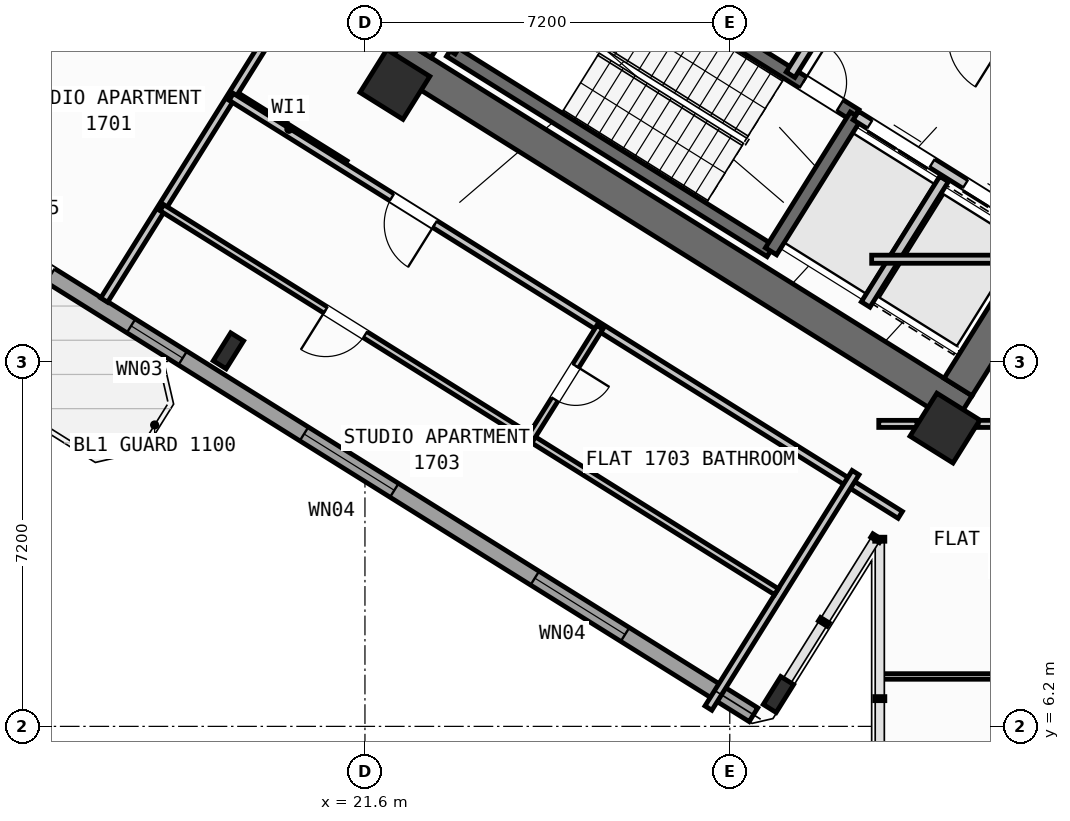
"""IFC4 building model, lengths in metres.
Left out: names, types, materials, properties, quantities, classifications, styles, units other than length and angle.
Written with IfcOpenShell. Run it as: python <this file> out.ifc"""

import sys

from ifc_helpers import new_model, si_unit, direction, frame, frame_2d, origin, origin_2d, place, context, subcontext, project, spatial, rectangle, hollow_rectangle, i_section, extrude, source, transform, mapped, element, fill, save


model = new_model("IFC4")
c1 = context("Model", 3, precision=1e-05, world=origin(), true_north=direction((0.0, 1.0)))
c2 = subcontext(c1, "Body", "Model", "MODEL_VIEW")
j1 = project(units=[si_unit("LENGTHUNIT", "METRE"), si_unit("PLANEANGLEUNIT", "RADIAN")], contexts=[c1])
p1 = place(None, origin())
s1 = spatial("IfcSite", under=j1, at=p1, CompositionType="ELEMENT")
p2 = place(p1, origin())
s2 = spatial("IfcBuilding", under=s1, at=p2, CompositionType="ELEMENT")
p3 = place(p2, frame((0.0, 0.0, 67.2)))
s3 = spatial("IfcBuildingStorey", under=s2, at=p3, CompositionType="ELEMENT", Elevation=67.2)
p4 = place(p3, frame((33.409, 12.45, 0.0), z_axis=(0.0, 0.0, 1.0), x_axis=(-0.848051132073, 0.529914405721, 0.0)))
e1 = element("IfcWall", 1, at=p4, inside=s3, PredefinedType="SHEAR", context=c2, shape_type="SweptSolid", body=[
    extrude(rectangle(XDim=13.24, YDim=0.65, at=frame_2d((6.62, 0.0))), origin(), (0.0, 0.0, 1.0), 4.22),
])
p5 = place(p3, frame((36.683, 18.304, 0.0), z_axis=(0.0, 0.0, 1.0), x_axis=(-0.529899109053, -0.848060690178, 0.0)))
e2 = element("IfcWall", 2, at=p5, inside=s3, PredefinedType="SHEAR", context=c2, shape_type="SweptSolid", body=[
    extrude(rectangle(XDim=6.375, YDim=0.65, at=frame_2d((3.188, 0.0))), origin(), (0.0, 0.0, 1.0), 4.22),
])
p6 = place(p3, frame((26.007, 24.976, 0.0), z_axis=(0.0, 0.0, 1.0), x_axis=(-0.529916319127, -0.848049936456, 0.0)))
e3 = element("IfcWall", 3, at=p6, inside=s3, PredefinedType="SHEAR", context=c2, shape_type="SweptSolid", body=[
    extrude(rectangle(XDim=6.375, YDim=0.65, at=frame_2d((3.188, 0.0))), origin(), (0.0, 0.0, 1.0), 4.22),
])
m1 = source(origin(), c2, "Body", "SweptSolid", [
    extrude(hollow_rectangle(XDim=1.0, YDim=1.0, WallThickness=0.04, at=origin_2d()), origin(), (0.0, 0.0, 1.0), 4.5),
])
p7 = place(p3, frame((33.046, 12.087, 0.0), z_axis=(0.0, 0.0, 1.0), x_axis=(-0.848048096156, 0.529919264233, 0.0)))
e4 = element("IfcColumn", 4, at=p7, inside=s3, PredefinedType="COLUMN", context=c2, shape_type="MappedRepresentation", body=[
    mapped(m1, transform((0.0, 0.0, 0.0), scale=1.0)),
])
m2 = source(origin(), c2, "Body", "SweptSolid", [
    extrude(i_section(OverallWidth=0.3, OverallDepth=0.65, WebThickness=0.016, FlangeThickness=0.031, at=origin_2d()), origin(), (0.0, 0.0, 1.0), 4.5),
])
p8 = place(p3, frame((29.761, 6.829, 0.0), z_axis=(0.0, 0.0, 1.0), x_axis=(-0.848048096156, 0.529919264233, 0.0)))
e5 = element("IfcColumn", 5, at=p8, inside=s3, PredefinedType="COLUMN", context=c2, shape_type="MappedRepresentation", body=[
    mapped(m2, transform((0.0, 0.0, 0.0), scale=1.0)),
])
p9 = place(p3, frame((22.191, 18.87, 0.0), z_axis=(0.0, 0.0, 1.0), x_axis=(-0.848048096156, 0.529919264233, 0.0)))
e6 = element("IfcColumn", 6, at=p9, inside=s3, PredefinedType="COLUMN", context=c2, shape_type="MappedRepresentation", body=[
    mapped(m1, transform((0.0, 0.0, 0.0), scale=1.0)),
])
p10 = place(p3, frame((18.906, 13.612, 0.0), z_axis=(0.0, 0.0, 1.0), x_axis=(-0.848048096156, 0.529919264233, 0.0)))
e7 = element("IfcColumn", 7, at=p10, inside=s3, PredefinedType="COLUMN", context=c2, shape_type="MappedRepresentation", body=[
    mapped(m2, transform((0.0, 0.0, 0.0), scale=1.0)),
])
p11 = place(p3, frame((29.268, 6.429, 0.0), z_axis=(0.0, 0.0, 1.0), x_axis=(-0.848049971435, 0.529916263149, 0.0)))
e8 = element("IfcWall", 8, at=p11, inside=s3, PredefinedType="STANDARD", context=c2, shape_type="SweptSolid", body=[
    extrude(rectangle(XDim=31.588, YDim=0.32, at=frame_2d((15.794, 0.0))), origin(), (0.0, 0.0, 1.0), 4.22),
])
p12 = place(p11, frame((16.362, 0.0, 0.0)))
e9 = element("IfcOpeningElement", 9, at=p12, cuts=e8, PredefinedType="OPENING", context=c2, shape_type="SweptSolid", body=[
    extrude(rectangle(XDim=1.2, YDim=2.15, at=frame_2d((0.6, 1.075))), frame((0.0, 0.17, 0.0), z_axis=(0.0, -1.0, 0.0), x_axis=(1.0, 0.0, 0.0)), (0.0, 0.0, 1.0), 0.34),
])
p13 = place(p11, frame((2.989, 0.0, 0.8)))
e10 = element("IfcOpeningElement", 10, at=p13, cuts=e8, PredefinedType="OPENING", context=c2, shape_type="SweptSolid", body=[
    extrude(rectangle(XDim=2.1, YDim=1.55, at=frame_2d((1.05, 0.775))), frame((0.0, 0.17, 0.0), z_axis=(0.0, -1.0, 0.0), x_axis=(1.0, 0.0, 0.0)), (0.0, 0.0, 1.0), 0.34),
])
p14 = place(p11, frame((8.359, 0.0, 0.8)))
e11 = element("IfcOpeningElement", 11, at=p14, cuts=e8, PredefinedType="OPENING", context=c2, shape_type="SweptSolid", body=[
    extrude(rectangle(XDim=2.1, YDim=1.55, at=frame_2d((1.05, 0.775))), frame((0.0, 0.17, 0.0), z_axis=(0.0, -1.0, 0.0), x_axis=(1.0, 0.0, 0.0)), (0.0, 0.0, 1.0), 0.34),
])
p15 = place(p11, frame((13.284, 0.0, 0.95)))
e12 = element("IfcOpeningElement", 12, at=p15, cuts=e8, PredefinedType="OPENING", context=c2, shape_type="SweptSolid", body=[
    extrude(rectangle(XDim=1.2, YDim=1.4, at=frame_2d((0.6, 0.7))), frame((0.0, 0.17, 0.0), z_axis=(0.0, -1.0, 0.0), x_axis=(1.0, 0.0, 0.0)), (0.0, 0.0, 1.0), 0.34),
])
p16 = place(p11, frame((29.188, 0.0, 0.95)))
e13 = element("IfcOpeningElement", 13, at=p16, cuts=e8, PredefinedType="OPENING", context=c2, shape_type="SweptSolid", body=[
    extrude(rectangle(XDim=1.2, YDim=1.4, at=frame_2d((0.6, 0.7))), frame((0.0, 0.17, 0.0), z_axis=(0.0, -1.0, 0.0), x_axis=(1.0, 0.0, 0.0)), (0.0, 0.0, 1.0), 0.34),
])
p17 = place(p11, frame((19.11, 0.0, 1.0)))
e14 = element("IfcOpeningElement", 14, at=p17, cuts=e8, PredefinedType="OPENING", context=c2, shape_type="SweptSolid", body=[
    extrude(rectangle(XDim=0.9, YDim=1.25, at=frame_2d((0.45, 0.625))), frame((0.0, 0.17, 0.0), z_axis=(0.0, -1.0, 0.0), x_axis=(1.0, 0.0, 0.0)), (0.0, 0.0, 1.0), 0.34),
])
p18 = place(p11, frame((21.226, 0.0, 1.0)))
e15 = element("IfcOpeningElement", 15, at=p18, cuts=e8, PredefinedType="OPENING", context=c2, shape_type="SweptSolid", body=[
    extrude(rectangle(XDim=0.9, YDim=1.25, at=frame_2d((0.45, 0.625))), frame((0.0, 0.17, 0.0), z_axis=(0.0, -1.0, 0.0), x_axis=(1.0, 0.0, 0.0)), (0.0, 0.0, 1.0), 0.34),
])
p19 = place(p11, frame((23.014, 0.0, 1.0)))
e16 = element("IfcOpeningElement", 16, at=p19, cuts=e8, PredefinedType="OPENING", context=c2, shape_type="SweptSolid", body=[
    extrude(rectangle(XDim=0.9, YDim=1.25, at=frame_2d((0.45, 0.625))), frame((0.0, 0.17, 0.0), z_axis=(0.0, -1.0, 0.0), x_axis=(1.0, 0.0, 0.0)), (0.0, 0.0, 1.0), 0.34),
])
p20 = place(p11, frame((24.802, 0.0, 1.0)))
e17 = element("IfcOpeningElement", 17, at=p20, cuts=e8, PredefinedType="OPENING", context=c2, shape_type="SweptSolid", body=[
    extrude(rectangle(XDim=0.9, YDim=1.25, at=frame_2d((0.45, 0.625))), frame((0.0, 0.17, 0.0), z_axis=(0.0, -1.0, 0.0), x_axis=(1.0, 0.0, 0.0)), (0.0, 0.0, 1.0), 0.34),
])
p21 = place(p11, frame((26.59, 0.0, 1.0)))
e18 = element("IfcOpeningElement", 18, at=p21, cuts=e8, PredefinedType="OPENING", context=c2, shape_type="SweptSolid", body=[
    extrude(rectangle(XDim=0.9, YDim=1.25, at=frame_2d((0.45, 0.625))), frame((0.0, 0.17, 0.0), z_axis=(0.0, -1.0, 0.0), x_axis=(1.0, 0.0, 0.0)), (0.0, 0.0, 1.0), 0.34),
])
p22 = place(p3, frame((29.605, 15.581, 0.0), z_axis=(0.0, 0.0, 1.0), x_axis=(-0.848036911448, 0.529937163087, 0.0)))
e19 = element("IfcWall", 19, at=p22, inside=s3, PredefinedType="SHEAR", context=c2, shape_type="SweptSolid", body=[
    extrude(rectangle(XDim=7.46, YDim=0.26, at=frame_2d((3.73, 0.0))), origin(), (0.0, 0.0, 1.0), 4.22),
])
p23 = place(p3, frame((31.28, 18.261, 0.0), z_axis=(0.0, 0.0, 1.0), x_axis=(-0.848051618787, 0.529913626805, 0.0)))
e20 = element("IfcWall", 20, at=p23, inside=s3, PredefinedType="SHEAR", context=c2, shape_type="SweptSolid", body=[
    extrude(rectangle(XDim=7.46, YDim=0.26, at=frame_2d((3.73, 0.0))), origin(), (0.0, 0.0, 1.0), 4.22),
])
p24 = place(p23, frame((0.36, 0.0, 0.0)))
e21 = element("IfcOpeningElement", 21, at=p24, cuts=e20, PredefinedType="OPENING", context=c2, shape_type="SweptSolid", body=[
    extrude(rectangle(XDim=0.86, YDim=2.05, at=frame_2d((0.43, 1.025))), frame((0.0, 0.14, 0.0), z_axis=(0.0, -1.0, 0.0), x_axis=(1.0, 0.0, 0.0)), (0.0, 0.0, 1.0), 0.28),
])
p25 = place(p3, frame((31.288, 18.256, 0.0), z_axis=(0.0, 0.0, 1.0), x_axis=(-0.529943379326, -0.848033026897, 0.0)))
e22 = element("IfcWall", 22, at=p25, inside=s3, PredefinedType="SHEAR", context=c2, shape_type="SweptSolid", body=[
    extrude(rectangle(XDim=3.16, YDim=0.26, at=frame_2d((1.58, 0.0))), origin(), (0.0, 0.0, 1.0), 4.22),
])
p26 = place(p3, frame((24.945, 22.22, 0.0), z_axis=(0.0, 0.0, 1.0), x_axis=(-0.529908658664, -0.84805472316, 0.0)))
e23 = element("IfcWall", 23, at=p26, inside=s3, PredefinedType="SHEAR", context=c2, shape_type="SweptSolid", body=[
    extrude(rectangle(XDim=3.16, YDim=0.26, at=frame_2d((1.58, 0.0))), origin(), (0.0, 0.0, 1.0), 4.22),
])
p27 = place(p3, frame((34.848, 16.031, 0.0), z_axis=(0.0, 0.0, 1.0), x_axis=(-0.848044042236, 0.529925751807, 0.0)))
e24 = element("IfcWall", 24, at=p27, inside=s3, PredefinedType="STANDARD", context=c2, shape_type="SweptSolid", body=[
    extrude(rectangle(XDim=4.198, YDim=0.2, at=frame_2d((2.099, 0.0))), origin(), (0.0, 0.0, 1.0), 4.21),
])
p28 = place(p27, frame((0.348, 0.0, 0.0)))
e25 = element("IfcOpeningElement", 25, at=p28, cuts=e24, PredefinedType="OPENING", context=c2, shape_type="SweptSolid", body=[
    extrude(rectangle(XDim=1.3, YDim=2.2, at=frame_2d((0.65, 1.1))), frame((0.0, 0.11, 0.0), z_axis=(0.0, -1.0, 0.0), x_axis=(1.0, 0.0, 0.0)), (0.0, 0.0, 1.0), 0.22),
])
p29 = place(p27, frame((2.423, 0.0, 0.0)))
e26 = element("IfcOpeningElement", 26, at=p29, cuts=e24, PredefinedType="OPENING", context=c2, shape_type="SweptSolid", body=[
    extrude(rectangle(XDim=1.45, YDim=2.25, at=frame_2d((0.725, 1.125))), frame((0.0, 0.11, 0.0), z_axis=(0.0, -1.0, 0.0), x_axis=(1.0, 0.0, 0.0)), (0.0, 0.0, 1.0), 0.22),
])
p30 = place(p3, frame((36.374, 18.474, 0.0), z_axis=(0.0, 0.0, 1.0), x_axis=(-0.848051071577, 0.529914502535, 0.0)))
e27 = element("IfcWall", 27, at=p30, inside=s3, PredefinedType="STANDARD", context=c2, shape_type="SweptSolid", body=[
    extrude(rectangle(XDim=5.718, YDim=0.2, at=frame_2d((2.859, 0.0))), origin(), (0.0, 0.0, 1.0), 4.21),
])
p31 = place(p30, frame((2.498, 0.0, 0.0)))
e28 = element("IfcOpeningElement", 28, at=p31, cuts=e27, PredefinedType="OPENING", context=c2, shape_type="SweptSolid", body=[
    extrude(rectangle(XDim=1.15, YDim=2.1, at=frame_2d((0.575, 1.05))), frame((0.0, 0.11, 0.0), z_axis=(0.0, -1.0, 0.0), x_axis=(1.0, 0.0, 0.0)), (0.0, 0.0, 1.0), 0.22),
])
p32 = place(p3, frame((33.029, 17.003, 0.0), z_axis=(0.0, 0.0, 1.0), x_axis=(-0.529916267533, -0.848049968695, 0.0)))
e29 = element("IfcWall", 29, at=p32, inside=s3, PredefinedType="STANDARD", context=c2, shape_type="SweptSolid", body=[
    extrude(rectangle(XDim=2.92, YDim=0.2, at=frame_2d((1.46, 0.0))), origin(), (0.0, 0.0, 1.0), 4.21),
])
p33 = place(p3, frame((31.525, 21.504, 0.0), z_axis=(0.0, 0.0, 1.0), x_axis=(-0.529907497854, -0.848055448493, 0.0)))
e30 = element("IfcWall", 30, at=p33, inside=s3, PredefinedType="STANDARD", context=c2, shape_type="SweptSolid", body=[
    extrude(rectangle(XDim=2.88, YDim=0.2, at=frame_2d((1.44, 0.0))), origin(), (0.0, 0.0, 1.0), 4.21),
])
p34 = place(p3, frame((21.206, 17.292, 0.0), z_axis=(0.0, 0.0, 1.0), x_axis=(-0.848050851465, 0.529914854792, 0.0)))
e31 = element("IfcWall", 31, at=p34, inside=s3, PredefinedType="PARTITIONING", context=c2, shape_type="SweptSolid", body=[
    extrude(rectangle(XDim=2.61, YDim=0.16, at=frame_2d((1.305, 0.0))), origin(), (0.0, 0.0, 1.0), 4.21),
])
p35 = place(p3, frame((23.899, 26.529, 0.0), z_axis=(0.0, 0.0, 1.0), x_axis=(-0.529917716469, -0.848049063305, 0.0)))
e32 = element("IfcWall", 32, at=p35, inside=s3, PredefinedType="PARTITIONING", context=c2, shape_type="SweptSolid", body=[
    extrude(rectangle(XDim=14.05, YDim=0.16, at=frame_2d((7.025, 0.0))), origin(), (0.0, 0.0, 1.0), 4.21),
])
p36 = place(p3, frame((16.492, 21.827, 0.0), z_axis=(0.0, 0.0, 1.0), x_axis=(-0.529904608059, -0.848057254175, 0.0)))
e33 = element("IfcWall", 33, at=p36, inside=s3, PredefinedType="PARTITIONING", context=c2, shape_type="SweptSolid", body=[
    extrude(rectangle(XDim=5.351, YDim=0.16, at=frame_2d((2.675, 0.0))), origin(), (0.0, 0.0, 1.0), 4.21),
])
p37 = place(p3, frame((16.848, 25.77, 0.0), z_axis=(0.0, 0.0, 1.0), x_axis=(-0.529910626741, -0.8480534934, 0.0)))
e34 = element("IfcWall", 34, at=p37, inside=s3, PredefinedType="PARTITIONING", context=c2, shape_type="SweptSolid", body=[
    extrude(rectangle(XDim=9.94, YDim=0.11, at=frame_2d((4.97, 0.0))), origin(), (0.0, 0.0, 1.0), 4.21),
])
p38 = place(p3, frame((32.164, 10.374, 0.0), z_axis=(0.0, 0.0, 1.0), x_axis=(-0.848044107957, 0.529925646633, 0.0)))
e35 = element("IfcWall", 35, at=p38, inside=s3, PredefinedType="PARTITIONING", context=c2, shape_type="SweptSolid", body=[
    extrude(rectangle(XDim=15.57, YDim=0.16, at=frame_2d((7.785, 0.0))), origin(), (0.0, 0.0, 1.0), 4.21),
])
p39 = place(p38, frame((10.83, 0.0, 0.0)))
e36 = element("IfcOpeningElement", 36, at=p39, cuts=e35, PredefinedType="OPENING", context=c2, shape_type="SweptSolid", body=[
    extrude(rectangle(XDim=1.0, YDim=2.1, at=frame_2d((0.5, 1.05))), frame((0.0, 0.09, 0.0), z_axis=(0.0, -1.0, 0.0), x_axis=(1.0, 0.0, 0.0)), (0.0, 0.0, 1.0), 0.18),
])
p40 = place(p3, frame((31.282, 11.208, 0.0), z_axis=(0.0, 0.0, 1.0), x_axis=(-0.529938869374, -0.84803584519, 0.0)))
e37 = element("IfcWall", 37, at=p40, inside=s3, PredefinedType="PARTITIONING", context=c2, shape_type="SweptSolid", body=[
    extrude(rectangle(XDim=5.48, YDim=0.16, at=frame_2d((2.74, 0.0))), origin(), (0.0, 0.0, 1.0), 4.21),
])
p41 = place(p3, frame((29.72, 8.859, 0.0), z_axis=(0.0, 0.0, 1.0), x_axis=(-0.848049134363, 0.529917602752, 0.0)))
e38 = element("IfcWall", 38, at=p41, inside=s3, PredefinedType="PLUMBINGWALL", context=c2, shape_type="SweptSolid", body=[
    extrude(rectangle(XDim=14.3, YDim=0.14, at=frame_2d((7.15, 0.0))), origin(), (0.0, 0.0, 1.0), 4.21),
])
p42 = place(p41, frame((9.57, 0.0, 0.0)))
e39 = element("IfcOpeningElement", 39, at=p42, cuts=e38, PredefinedType="OPENING", context=c2, shape_type="SweptSolid", body=[
    extrude(rectangle(XDim=0.92, YDim=2.08, at=frame_2d((0.46, 1.04))), frame((0.0, 0.08, 0.0), z_axis=(0.0, -1.0, 0.0), x_axis=(1.0, 0.0, 0.0)), (0.0, 0.0, 1.0), 0.16),
])
p43 = place(p3, frame((26.237, 14.078, 0.0), z_axis=(0.0, 0.0, 1.0), x_axis=(-0.52995640672, -0.848024885824, 0.0)))
e40 = element("IfcWall", 40, at=p43, inside=s3, PredefinedType="PLUMBINGWALL", context=c2, shape_type="SweptSolid", body=[
    extrude(rectangle(XDim=2.58, YDim=0.14, at=frame_2d((1.29, 0.0))), origin(), (0.0, 0.0, 1.0), 4.21),
])
p44 = place(p43, frame((0.9, 0.0, 0.0)))
e41 = element("IfcOpeningElement", 41, at=p44, cuts=e40, PredefinedType="OPENING", context=c2, shape_type="SweptSolid", body=[
    extrude(rectangle(XDim=0.78, YDim=2.05, at=frame_2d((0.39, 1.025))), frame((0.0, 0.08, 0.0), z_axis=(0.0, -1.0, 0.0), x_axis=(1.0, 0.0, 0.0)), (0.0, 0.0, 1.0), 0.16),
])
p45 = place(p3, frame((31.6, 15.42, 0.0), z_axis=(0.0, 0.0, 1.0), x_axis=(1.0, 0.0, 0.0)))
e42 = element("IfcWall", 42, at=p45, inside=s3, PredefinedType="PARTITIONING", context=c2, shape_type="SweptSolid", body=[
    extrude(rectangle(XDim=2.866, YDim=0.16, at=frame_2d((1.433, 0.0))), origin(), (0.0, 0.0, 1.0), 4.21),
])
p46 = place(p3, frame((31.74, 12.17, 0.0), z_axis=(0.0, 0.0, 1.0), x_axis=(1.0, 0.0, 0.0)))
e43 = element("IfcWall", 43, at=p46, inside=s3, PredefinedType="PLUMBINGWALL", context=c2, shape_type="SweptSolid", body=[
    extrude(rectangle(XDim=0.754, YDim=0.14, at=frame_2d((0.377, 0.0))), origin(), (0.0, 0.0, 1.0), 4.21),
])
p47 = place(p3, frame((33.702, 12.17, 0.0), z_axis=(0.0, 0.0, 1.0), x_axis=(1.0, 0.0, 0.0)))
e44 = element("IfcWall", 44, at=p47, inside=s3, PredefinedType="PLUMBINGWALL", context=c2, shape_type="SweptSolid", body=[
    extrude(rectangle(XDim=8.642, YDim=0.14, at=frame_2d((4.321, 0.0))), origin(), (0.0, 0.0, 1.0), 3.395),
])
p48 = place(p47, frame((3.06, 0.0, 0.0)))
e45 = element("IfcOpeningElement", 45, at=p48, cuts=e44, PredefinedType="OPENING", context=c2, shape_type="SweptSolid", body=[
    extrude(rectangle(XDim=0.92, YDim=2.08, at=frame_2d((0.46, 1.04))), frame((0.0, 0.08, 0.0), z_axis=(0.0, -1.0, 0.0), x_axis=(1.0, 0.0, 0.0)), (0.0, 0.0, 1.0), 0.16),
])
p49 = place(p3, frame((31.74, 7.185, 0.0), z_axis=(0.0, 0.0, 1.0), x_axis=(1.0, 0.0, 0.0)))
e46 = element("IfcWall", 46, at=p49, inside=s3, PredefinedType="PARTITIONING", context=c2, shape_type="SweptSolid", body=[
    extrude(rectangle(XDim=10.604, YDim=0.11, at=frame_2d((5.302, 0.0))), origin(), (0.0, 0.0, 1.0), 4.21),
])
p50 = place(p49, frame((5.022, 0.0, 0.0)))
e47 = element("IfcOpeningElement", 47, at=p50, cuts=e46, PredefinedType="OPENING", context=c2, shape_type="SweptSolid", body=[
    extrude(rectangle(XDim=0.92, YDim=2.08, at=frame_2d((0.46, 1.04))), frame((0.0, 0.065, 0.0), z_axis=(0.0, -1.0, 0.0), x_axis=(1.0, 0.0, 0.0)), (0.0, 0.0, 1.0), 0.13),
])
m3 = source(origin(), c2, "Body", "SweptSolid", [
    extrude(rectangle(XDim=2.1, YDim=1.55, at=frame_2d((1.05, 0.775))), frame((0.0, 0.03, 0.0), z_axis=(0.0, -1.0, 0.0), x_axis=(1.0, 0.0, 0.0)), (0.0, 0.0, 1.0), 0.06),
])
p51 = place(p13, origin())
e48 = element("IfcWindow", 48, at=p51, inside=s3, PartitioningType="SINGLE_PANEL", PredefinedType="WINDOW", context=c2, shape_type="MappedRepresentation", body=[
    mapped(m3, transform((0.0, 0.0, 0.0), scale=1.0)),
])
fill(e10, e48)
p52 = place(p14, origin())
e49 = element("IfcWindow", 49, at=p52, inside=s3, PartitioningType="SINGLE_PANEL", PredefinedType="WINDOW", context=c2, shape_type="MappedRepresentation", body=[
    mapped(m3, transform((0.0, 0.0, 0.0), scale=1.0)),
])
fill(e11, e49)
m4 = source(origin(), c2, "Body", "SweptSolid", [
    extrude(rectangle(XDim=1.2, YDim=1.4, at=frame_2d((0.6, 0.7))), frame((0.0, 0.03, 0.0), z_axis=(0.0, -1.0, 0.0), x_axis=(1.0, 0.0, 0.0)), (0.0, 0.0, 1.0), 0.06),
])
p53 = place(p15, origin())
e50 = element("IfcWindow", 50, at=p53, inside=s3, PartitioningType="SINGLE_PANEL", PredefinedType="WINDOW", context=c2, shape_type="MappedRepresentation", body=[
    mapped(m4, transform((0.0, 0.0, 0.0), scale=1.0)),
])
fill(e12, e50)
m5 = source(origin(), c2, "Body", "SweptSolid", [
    extrude(rectangle(XDim=0.86, YDim=2.05, at=frame_2d((0.43, 1.025))), frame((0.0, 0.025, 0.0), z_axis=(0.0, -1.0, 0.0), x_axis=(1.0, 0.0, 0.0)), (0.0, 0.0, 1.0), 0.05),
])
p54 = place(p24, frame((0.86, 0.0, 0.0), z_axis=(0.0, 0.0, 1.0), x_axis=(-1.0, 0.0, 0.0)))
e51 = element("IfcDoor", 51, at=p54, inside=s3, OperationType="SINGLE_SWING_LEFT", PredefinedType="DOOR", context=c2, shape_type="MappedRepresentation", body=[
    mapped(m5, transform((0.0, 0.0, 0.0), scale=1.0)),
])
fill(e21, e51)
m6 = source(origin(), c2, "Body", "SweptSolid", [
    extrude(rectangle(XDim=1.3, YDim=2.2, at=frame_2d((0.65, 1.1))), frame((0.0, 0.025, 0.0), z_axis=(0.0, -1.0, 0.0), x_axis=(1.0, 0.0, 0.0)), (0.0, 0.0, 1.0), 0.05),
])
p55 = place(p28, origin())
e52 = element("IfcDoor", 52, at=p55, inside=s3, OperationType="DOUBLE_DOOR_SLIDING", PredefinedType="DOOR", context=c2, shape_type="MappedRepresentation", body=[
    mapped(m6, transform((0.0, 0.0, 0.0), scale=1.0)),
])
fill(e25, e52)
m7 = source(origin(), c2, "Body", "SweptSolid", [
    extrude(rectangle(XDim=1.45, YDim=2.25, at=frame_2d((0.725, 1.125))), frame((0.0, 0.025, 0.0), z_axis=(0.0, -1.0, 0.0), x_axis=(1.0, 0.0, 0.0)), (0.0, 0.0, 1.0), 0.05),
])
p56 = place(p29, origin())
e53 = element("IfcDoor", 53, at=p56, inside=s3, OperationType="DOUBLE_DOOR_SLIDING", PredefinedType="DOOR", context=c2, shape_type="MappedRepresentation", body=[
    mapped(m7, transform((0.0, 0.0, 0.0), scale=1.0)),
])
fill(e26, e53)
m8 = source(origin(), c2, "Body", "SweptSolid", [
    extrude(rectangle(XDim=1.0, YDim=2.1, at=frame_2d((0.5, 1.05))), frame((0.0, 0.025, 0.0), z_axis=(0.0, -1.0, 0.0), x_axis=(1.0, 0.0, 0.0)), (0.0, 0.0, 1.0), 0.05),
])
p57 = place(p39, origin())
e54 = element("IfcDoor", 54, at=p57, inside=s3, OperationType="SINGLE_SWING_LEFT", PredefinedType="DOOR", context=c2, shape_type="MappedRepresentation", body=[
    mapped(m8, transform((0.0, 0.0, 0.0), scale=1.0)),
])
fill(e36, e54)
m9 = source(origin(), c2, "Body", "SweptSolid", [
    extrude(rectangle(XDim=0.92, YDim=2.08, at=frame_2d((0.46, 1.04))), frame((0.0, 0.025, 0.0), z_axis=(0.0, -1.0, 0.0), x_axis=(1.0, 0.0, 0.0)), (0.0, 0.0, 1.0), 0.05),
])
p58 = place(p42, origin())
e55 = element("IfcDoor", 55, at=p58, inside=s3, OperationType="SINGLE_SWING_RIGHT", PredefinedType="DOOR", context=c2, shape_type="MappedRepresentation", body=[
    mapped(m9, transform((0.0, 0.0, 0.0), scale=1.0)),
])
fill(e39, e55)
m10 = source(origin(), c2, "Body", "SweptSolid", [
    extrude(rectangle(XDim=0.78, YDim=2.05, at=frame_2d((0.39, 1.025))), frame((0.0, 0.025, 0.0), z_axis=(0.0, -1.0, 0.0), x_axis=(1.0, 0.0, 0.0)), (0.0, 0.0, 1.0), 0.05),
])
p59 = place(p44, origin())
e56 = element("IfcDoor", 56, at=p59, inside=s3, OperationType="SINGLE_SWING_LEFT", PredefinedType="DOOR", context=c2, shape_type="MappedRepresentation", body=[
    mapped(m10, transform((0.0, 0.0, 0.0), scale=1.0)),
])
fill(e41, e56)
save(model, sys.argv[1])
